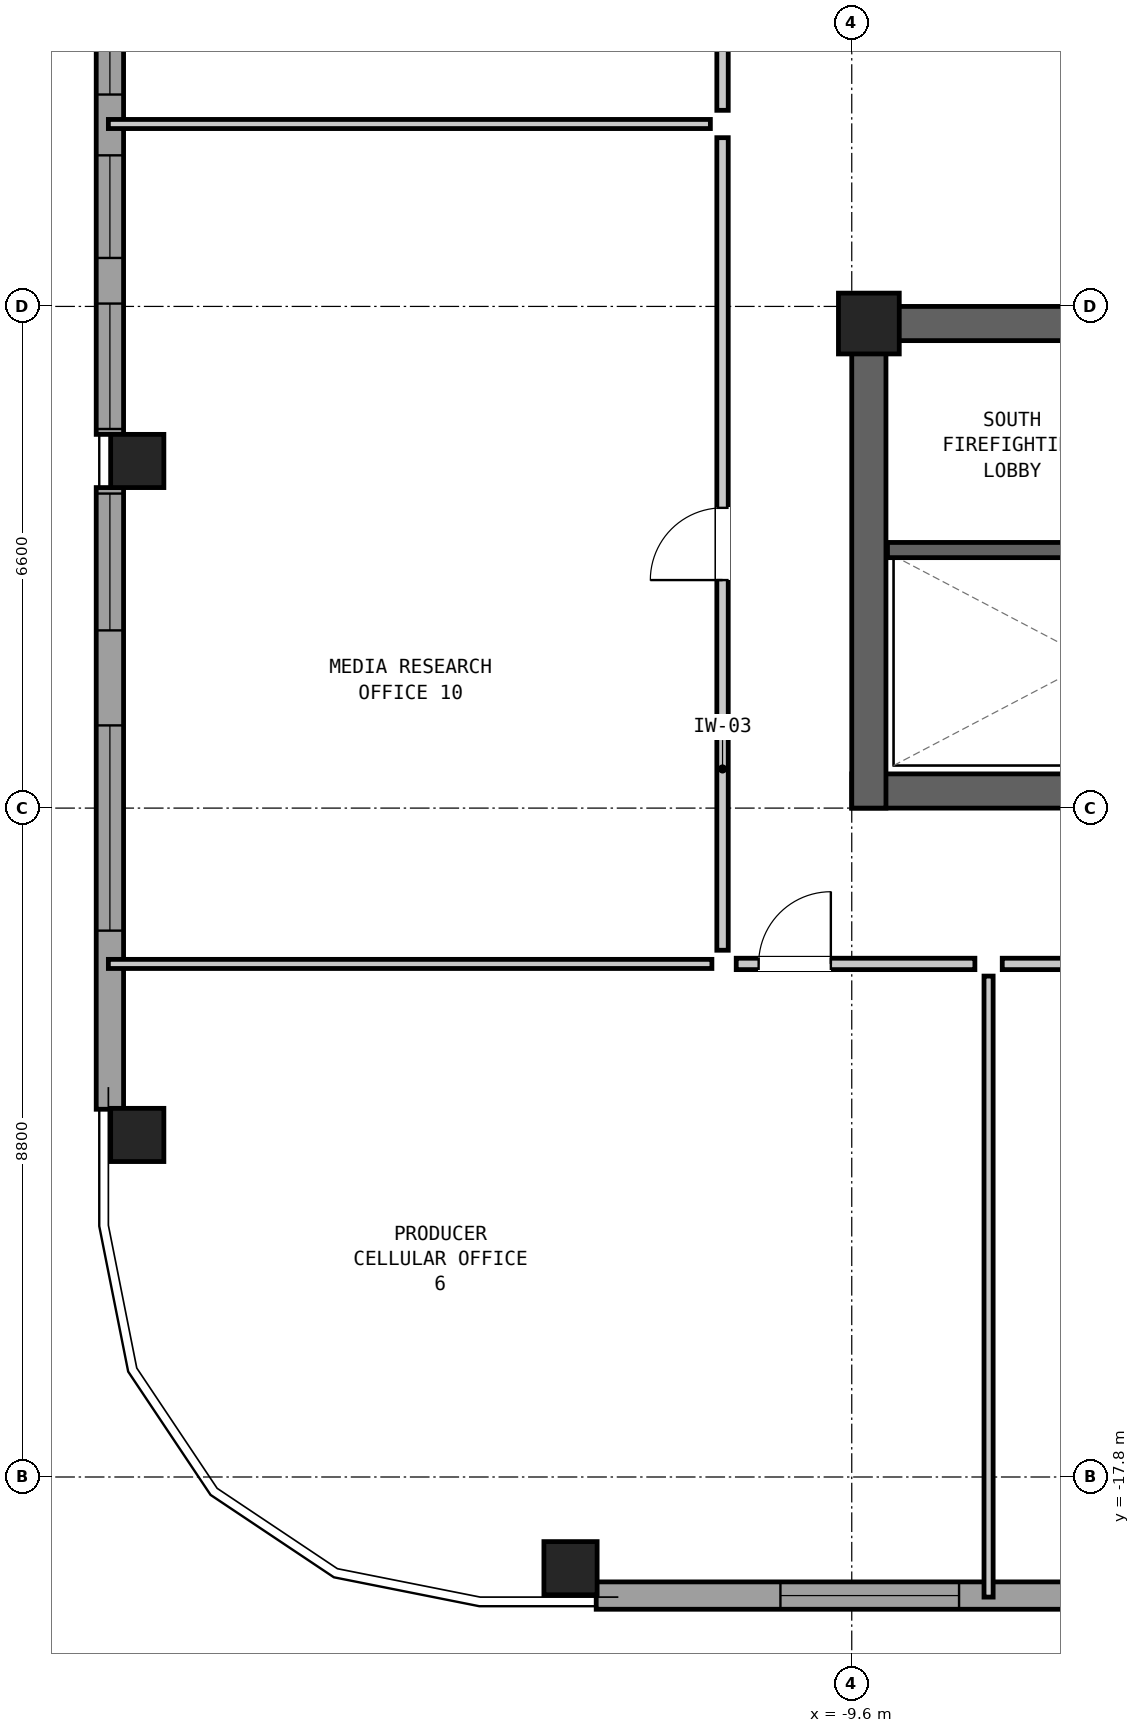
"""IFC4 building model, lengths in metres.
Left out: names, types, materials, properties, quantities, classifications, styles, units other than length and angle.
Written with IfcOpenShell. Run it as: python <this file> out.ifc"""

import sys

from ifc_helpers import new_model, si_unit, direction, frame, frame_2d, origin, origin_2d, place, context, subcontext, project, spatial, rectangle, hollow_rectangle, extrude, element, fill, save


model = new_model("IFC4")
c1 = context("Model", 3, precision=1e-05, world=origin(), true_north=direction((0.0, 1.0)))
c2 = subcontext(c1, "Body", "Model", "MODEL_VIEW")
j1 = project(units=[si_unit("LENGTHUNIT", "METRE"), si_unit("PLANEANGLEUNIT", "RADIAN")], contexts=[c1])
p1 = place(None, origin())
s1 = spatial("IfcSite", under=j1, at=p1, CompositionType="ELEMENT")
p2 = place(p1, origin())
s2 = spatial("IfcBuilding", under=s1, at=p2, CompositionType="ELEMENT")
p3 = place(p2, frame((0.0, 0.0, 208.65)))
s3 = spatial("IfcBuildingStorey", under=s2, at=p3, CompositionType="ELEMENT", Elevation=208.65)
p4 = place(p3, frame((-9.6, -8.775, 0.0), z_axis=(0.0, 0.0, 1.0), x_axis=(1.0, 0.0, 0.0)))
e1 = element("IfcWall", 1, at=p4, inside=s3, PredefinedType="SHEAR", context=c2, shape_type="SweptSolid", body=[
    extrude(rectangle(XDim=19.2, YDim=0.45, at=frame_2d((9.6, 0.0))), origin(), (0.0, 0.0, 1.0), 3.05),
])
p5 = place(p3, frame((-9.6, -2.625, 0.0), z_axis=(0.0, 0.0, 1.0), x_axis=(1.0, 0.0, 0.0)))
e2 = element("IfcWall", 2, at=p5, inside=s3, PredefinedType="SHEAR", context=c2, shape_type="SweptSolid", body=[
    extrude(rectangle(XDim=19.2, YDim=0.45, at=frame_2d((9.6, 0.0))), origin(), (0.0, 0.0, 1.0), 3.05),
])
p6 = place(p5, frame((3.8, 0.0, 0.0)))
e3 = element("IfcOpeningElement", 3, at=p6, cuts=e2, PredefinedType="OPENING", context=c2, shape_type="SweptSolid", body=[
    extrude(rectangle(XDim=1.1, YDim=2.08, at=frame_2d((0.55, 1.04))), frame((0.0, 0.237, 0.0), z_axis=(0.0, -1.0, 0.0), x_axis=(1.0, 0.0, 0.0)), (0.0, 0.0, 1.0), 0.474),
])
p7 = place(p5, frame((10.8, 0.0, 0.0)))
e4 = element("IfcOpeningElement", 4, at=p7, cuts=e2, PredefinedType="OPENING", context=c2, shape_type="SweptSolid", body=[
    extrude(rectangle(XDim=0.95, YDim=2.1, at=frame_2d((0.475, 1.05))), frame((0.0, 0.237, 0.0), z_axis=(0.0, -1.0, 0.0), x_axis=(1.0, 0.0, 0.0)), (0.0, 0.0, 1.0), 0.474),
])
p8 = place(p5, frame((14.8, 0.0, 0.0)))
e5 = element("IfcOpeningElement", 5, at=p8, cuts=e2, PredefinedType="OPENING", context=c2, shape_type="SweptSolid", body=[
    extrude(rectangle(XDim=1.6, YDim=2.12, at=frame_2d((0.8, 1.06))), frame((0.0, 0.237, 0.0), z_axis=(0.0, -1.0, 0.0), x_axis=(1.0, 0.0, 0.0)), (0.0, 0.0, 1.0), 0.474),
])
p9 = place(p3, frame((-9.375, -9.0, 0.0), z_axis=(0.0, 0.0, 1.0), x_axis=(0.0, 1.0, 0.0)))
e6 = element("IfcWall", 6, at=p9, inside=s3, PredefinedType="SHEAR", context=c2, shape_type="SweptSolid", body=[
    extrude(rectangle(XDim=6.6, YDim=0.45, at=frame_2d((3.3, 0.0))), origin(), (0.0, 0.0, 1.0), 3.05),
])
for number, where, z_axis, x_axis in (
    (7, (-13.3, -19.0, 0.0), (0.0, 0.0, 1.0), (1.0, 0.0, 0.0)),
    (8, (-19.0, -4.433, 0.0), (0.0, 0.0, 1.0), (0.0, 1.0, 0.0)),
    (9, (-19.0, -13.3, 0.0), (0.0, 0.0, 1.0), (0.0, 1.0, 0.0)),
):
    element("IfcColumn", number, at=place(p3, frame(where, z_axis=z_axis, x_axis=x_axis)), inside=s3, PredefinedType="COLUMN", context=c2, shape_type="SweptSolid", body=[
        extrude(hollow_rectangle(XDim=0.7, YDim=0.7, WallThickness=0.045, at=origin_2d()), origin(), (0.0, 0.0, 1.0), 3.05),
    ])
p10 = place(p3, frame((-9.375, -2.625, 0.0), z_axis=(0.0, 0.0, 1.0), x_axis=(1.0, 0.0, 0.0)))
e10 = element("IfcColumn", 10, at=p10, inside=s3, PredefinedType="COLUMN", context=c2, shape_type="SweptSolid", body=[
    extrude(rectangle(XDim=0.8, YDim=0.8, at=origin_2d()), origin(), (0.0, 0.0, 1.0), 3.05),
])
p11 = place(p3, frame((-4.783, -19.36, 0.0), z_axis=(0.0, 0.0, 1.0), x_axis=(-1.0, 0.0, 0.0)))
e11 = element("IfcWall", 11, at=p11, inside=s3, PredefinedType="SOLIDWALL", context=c2, shape_type="SweptSolid", body=[
    extrude(rectangle(XDim=8.179, YDim=0.36, at=frame_2d((4.089, 0.0))), origin(), (0.0, 0.0, 1.0), 2.374),
])
p12 = place(p11, frame((0.055, 0.0, 1.2)))
e12 = element("IfcOpeningElement", 12, at=p12, cuts=e11, PredefinedType="OPENING", context=c2, shape_type="SweptSolid", body=[
    extrude(rectangle(XDim=1.75, YDim=1.0, at=frame_2d((0.875, 0.5))), frame((0.0, 0.192, 0.0), z_axis=(0.0, -1.0, 0.0), x_axis=(1.0, 0.0, 0.0)), (0.0, 0.0, 1.0), 0.384),
])
p13 = place(p11, frame((3.405, 0.0, 0.2)))
e13 = element("IfcOpeningElement", 13, at=p13, cuts=e11, PredefinedType="OPENING", context=c2, shape_type="SweptSolid", body=[
    extrude(rectangle(XDim=2.35, YDim=1.15, at=frame_2d((1.175, 0.575))), frame((0.0, 0.192, 0.0), z_axis=(0.0, -1.0, 0.0), x_axis=(1.0, 0.0, 0.0)), (0.0, 0.0, 1.0), 0.384),
])
p14 = place(p3, frame((-19.36, -12.962, 0.0), z_axis=(0.0, 0.0, 1.0), x_axis=(0.0, 1.0, 0.0)))
e14 = element("IfcWall", 14, at=p14, inside=s3, PredefinedType="SOLIDWALL", context=c2, shape_type="SweptSolid", body=[
    extrude(rectangle(XDim=8.179, YDim=0.36, at=frame_2d((4.089, 0.0))), origin(), (0.0, 0.0, 1.0), 2.374),
])
p15 = place(p14, frame((2.35, 0.0, 0.2)))
e15 = element("IfcOpeningElement", 15, at=p15, cuts=e14, PredefinedType="OPENING", context=c2, shape_type="SweptSolid", body=[
    extrude(rectangle(XDim=2.7, YDim=1.2, at=frame_2d((1.35, 0.6))), frame((0.0, 0.192, 0.0), z_axis=(0.0, -1.0, 0.0), x_axis=(1.0, 0.0, 0.0)), (0.0, 0.0, 1.0), 0.384),
])
p16 = place(p14, frame((6.3, 0.0, 1.15)))
e16 = element("IfcOpeningElement", 16, at=p16, cuts=e14, PredefinedType="OPENING", context=c2, shape_type="SweptSolid", body=[
    extrude(rectangle(XDim=1.8, YDim=1.05, at=frame_2d((0.9, 0.525))), frame((0.0, 0.192, 0.0), z_axis=(0.0, -1.0, 0.0), x_axis=(1.0, 0.0, 0.0)), (0.0, 0.0, 1.0), 0.384),
])
p17 = place(p3, frame((-19.36, -4.083, 0.0), z_axis=(0.0, 0.0, 1.0), x_axis=(0.0, 1.0, 0.0)))
e17 = element("IfcWall", 17, at=p17, inside=s3, PredefinedType="SOLIDWALL", context=c2, shape_type="SweptSolid", body=[
    extrude(rectangle(XDim=8.167, YDim=0.36, at=frame_2d((4.083, 0.0))), origin(), (0.0, 0.0, 1.0), 2.374),
])
p18 = place(p17, frame((0.071, 0.0, 1.3)))
e18 = element("IfcOpeningElement", 18, at=p18, cuts=e17, PredefinedType="OPENING", context=c2, shape_type="SweptSolid", body=[
    extrude(rectangle(XDim=1.65, YDim=0.9, at=frame_2d((0.825, 0.45))), frame((0.0, 0.192, 0.0), z_axis=(0.0, -1.0, 0.0), x_axis=(1.0, 0.0, 0.0)), (0.0, 0.0, 1.0), 0.384),
])
p19 = place(p17, frame((2.321, 0.0, 0.2)))
e19 = element("IfcOpeningElement", 19, at=p19, cuts=e17, PredefinedType="OPENING", context=c2, shape_type="SweptSolid", body=[
    extrude(rectangle(XDim=1.35, YDim=0.95, at=frame_2d((0.675, 0.475))), frame((0.0, 0.192, 0.0), z_axis=(0.0, -1.0, 0.0), x_axis=(1.0, 0.0, 0.0)), (0.0, 0.0, 1.0), 0.384),
])
p20 = place(p17, frame((4.471, 0.0, 0.2)))
e20 = element("IfcOpeningElement", 20, at=p20, cuts=e17, PredefinedType="OPENING", context=c2, shape_type="SweptSolid", body=[
    extrude(rectangle(XDim=1.45, YDim=0.9, at=frame_2d((0.725, 0.45))), frame((0.0, 0.192, 0.0), z_axis=(0.0, -1.0, 0.0), x_axis=(1.0, 0.0, 0.0)), (0.0, 0.0, 1.0), 0.384),
])
p21 = place(p17, frame((6.521, 0.0, 1.25)))
e21 = element("IfcOpeningElement", 21, at=p21, cuts=e17, PredefinedType="OPENING", context=c2, shape_type="SweptSolid", body=[
    extrude(rectangle(XDim=1.6, YDim=0.95, at=frame_2d((0.8, 0.475))), frame((0.0, 0.192, 0.0), z_axis=(0.0, -1.0, 0.0), x_axis=(1.0, 0.0, 0.0)), (0.0, 0.0, 1.0), 0.384),
])
p22 = place(p3, frame((-9.13, -5.605, 0.0), z_axis=(0.0, 0.0, 1.0), x_axis=(1.0, 0.0, 0.0)))
e22 = element("IfcWall", 22, at=p22, inside=s3, PredefinedType="SHEAR", context=c2, shape_type="SweptSolid", body=[
    extrude(rectangle(XDim=6.77, YDim=0.2, at=frame_2d((3.385, 0.0))), origin(), (0.0, 0.0, 1.0), 2.86),
])
p23 = place(p22, frame((5.5, 0.0, 0.0)))
e23 = element("IfcOpeningElement", 23, at=p23, cuts=e22, PredefinedType="OPENING", context=c2, shape_type="SweptSolid", body=[
    extrude(rectangle(XDim=1.05, YDim=2.08, at=frame_2d((0.525, 1.04))), frame((0.0, 0.112, 0.0), z_axis=(0.0, -1.0, 0.0), x_axis=(1.0, 0.0, 0.0)), (0.0, 0.0, 1.0), 0.224),
])
p24 = place(p3, frame((-19.38, -11.05, 0.0), z_axis=(0.0, 0.0, 1.0), x_axis=(1.0, 0.0, 0.0)))
e24 = element("IfcWall", 24, at=p24, inside=s3, PredefinedType="PARTITIONING", context=c2, shape_type="SweptSolid", body=[
    extrude(rectangle(XDim=7.94, YDim=0.12, at=frame_2d((3.97, 0.0))), origin(), (0.0, 0.0, 1.0), 2.86),
])
p25 = place(p3, frame((-7.8, -19.38, 0.0), z_axis=(0.0, 0.0, 1.0), x_axis=(0.0, 1.0, 0.0)))
e25 = element("IfcWall", 25, at=p25, inside=s3, PredefinedType="PARTITIONING", context=c2, shape_type="SweptSolid", body=[
    extrude(rectangle(XDim=8.17, YDim=0.12, at=frame_2d((4.085, 0.0))), origin(), (0.0, 0.0, 1.0), 2.86),
])
p26 = place(p3, frame((-19.38, 0.0, 0.0), z_axis=(0.0, 0.0, 1.0), x_axis=(1.0, 0.0, 0.0)))
e26 = element("IfcWall", 26, at=p26, inside=s3, PredefinedType="PARTITIONING", context=c2, shape_type="SweptSolid", body=[
    extrude(rectangle(XDim=7.92, YDim=0.12, at=frame_2d((3.96, 0.0))), origin(), (0.0, 0.0, 1.0), 2.86),
])
p27 = place(p3, frame((-11.12, -11.05, 0.0), z_axis=(0.0, 0.0, 1.0), x_axis=(1.0, 0.0, 0.0)))
e27 = element("IfcWall", 27, at=p27, inside=s3, PredefinedType="PARTITIONING", context=c2, shape_type="SweptSolid", body=[
    extrude(rectangle(XDim=3.14, YDim=0.15, at=frame_2d((1.57, 0.0))), origin(), (0.0, 0.0, 1.0), 2.86),
])
p28 = place(p27, frame((0.295, 0.0, 0.0)))
e28 = element("IfcOpeningElement", 28, at=p28, cuts=e27, PredefinedType="OPENING", context=c2, shape_type="SweptSolid", body=[
    extrude(rectangle(XDim=0.95, YDim=2.1, at=frame_2d((0.475, 1.05))), frame((0.0, 0.087, 0.0), z_axis=(0.0, -1.0, 0.0), x_axis=(1.0, 0.0, 0.0)), (0.0, 0.0, 1.0), 0.174),
])
p29 = place(p3, frame((-7.62, -11.05, 0.0), z_axis=(0.0, 0.0, 1.0), x_axis=(1.0, 0.0, 0.0)))
e29 = element("IfcWall", 29, at=p29, inside=s3, PredefinedType="PARTITIONING", context=c2, shape_type="SweptSolid", body=[
    extrude(rectangle(XDim=5.24, YDim=0.15, at=frame_2d((2.62, 0.0))), origin(), (0.0, 0.0, 1.0), 2.86),
])
p30 = place(p29, frame((2.145, 0.0, 0.0)))
e30 = element("IfcOpeningElement", 30, at=p30, cuts=e29, PredefinedType="OPENING", context=c2, shape_type="SweptSolid", body=[
    extrude(rectangle(XDim=0.95, YDim=2.1, at=frame_2d((0.475, 1.05))), frame((0.0, 0.087, 0.0), z_axis=(0.0, -1.0, 0.0), x_axis=(1.0, 0.0, 0.0)), (0.0, 0.0, 1.0), 0.174),
])
p31 = place(p3, frame((-11.3, -10.87, 0.0), z_axis=(0.0, 0.0, 1.0), x_axis=(0.0, 1.0, 0.0)))
e31 = element("IfcWall", 31, at=p31, inside=s3, PredefinedType="PARTITIONING", context=c2, shape_type="SweptSolid", body=[
    extrude(rectangle(XDim=10.69, YDim=0.15, at=frame_2d((5.345, 0.0))), origin(), (0.0, 0.0, 1.0), 2.86),
])
p32 = place(p31, frame((4.87, 0.0, 0.0)))
e32 = element("IfcOpeningElement", 32, at=p32, cuts=e31, PredefinedType="OPENING", context=c2, shape_type="SweptSolid", body=[
    extrude(rectangle(XDim=0.95, YDim=2.1, at=frame_2d((0.475, 1.05))), frame((0.0, 0.087, 0.0), z_axis=(0.0, -1.0, 0.0), x_axis=(1.0, 0.0, 0.0)), (0.0, 0.0, 1.0), 0.174),
])
p33 = place(p3, frame((-11.3, 0.18, 0.0), z_axis=(0.0, 0.0, 1.0), x_axis=(0.0, 1.0, 0.0)))
e33 = element("IfcWall", 33, at=p33, inside=s3, PredefinedType="PARTITIONING", context=c2, shape_type="SweptSolid", body=[
    extrude(rectangle(XDim=11.89, YDim=0.15, at=frame_2d((5.945, 0.0))), origin(), (0.0, 0.0, 1.0), 2.86),
])
p34 = place(p33, frame((5.47, 0.0, 0.0)))
e34 = element("IfcOpeningElement", 34, at=p34, cuts=e33, PredefinedType="OPENING", context=c2, shape_type="SweptSolid", body=[
    extrude(rectangle(XDim=0.95, YDim=2.1, at=frame_2d((0.475, 1.05))), frame((0.0, 0.087, 0.0), z_axis=(0.0, -1.0, 0.0), x_axis=(1.0, 0.0, 0.0)), (0.0, 0.0, 1.0), 0.174),
])
p35 = place(p13, origin())
e35 = element("IfcWindow", 35, at=p35, inside=s3, PartitioningType="SINGLE_PANEL", PredefinedType="WINDOW", context=c2, shape_type="SweptSolid", body=[
    extrude(rectangle(XDim=2.35, YDim=1.15, at=frame_2d((1.175, 0.575))), frame((0.0, 0.03, 0.0), z_axis=(0.0, -1.0, 0.0), x_axis=(1.0, 0.0, 0.0)), (0.0, 0.0, 1.0), 0.06),
])
fill(e13, e35)
p36 = place(p15, origin())
e36 = element("IfcWindow", 36, at=p36, inside=s3, PartitioningType="SINGLE_PANEL", PredefinedType="WINDOW", context=c2, shape_type="SweptSolid", body=[
    extrude(rectangle(XDim=2.7, YDim=1.2, at=frame_2d((1.35, 0.6))), frame((0.0, 0.03, 0.0), z_axis=(0.0, -1.0, 0.0), x_axis=(1.0, 0.0, 0.0)), (0.0, 0.0, 1.0), 0.06),
])
fill(e15, e36)
p37 = place(p16, origin())
e37 = element("IfcWindow", 37, at=p37, inside=s3, PartitioningType="SINGLE_PANEL", PredefinedType="WINDOW", context=c2, shape_type="SweptSolid", body=[
    extrude(rectangle(XDim=1.8, YDim=1.05, at=frame_2d((0.9, 0.525))), frame((0.0, 0.03, 0.0), z_axis=(0.0, -1.0, 0.0), x_axis=(1.0, 0.0, 0.0)), (0.0, 0.0, 1.0), 0.06),
])
fill(e16, e37)
p38 = place(p18, origin())
e38 = element("IfcWindow", 38, at=p38, inside=s3, PartitioningType="SINGLE_PANEL", PredefinedType="WINDOW", context=c2, shape_type="SweptSolid", body=[
    extrude(rectangle(XDim=1.65, YDim=0.9, at=frame_2d((0.825, 0.45))), frame((0.0, 0.03, 0.0), z_axis=(0.0, -1.0, 0.0), x_axis=(1.0, 0.0, 0.0)), (0.0, 0.0, 1.0), 0.06),
])
fill(e18, e38)
p39 = place(p19, origin())
e39 = element("IfcWindow", 39, at=p39, inside=s3, PartitioningType="SINGLE_PANEL", PredefinedType="WINDOW", context=c2, shape_type="SweptSolid", body=[
    extrude(rectangle(XDim=1.35, YDim=0.95, at=frame_2d((0.675, 0.475))), frame((0.0, 0.03, 0.0), z_axis=(0.0, -1.0, 0.0), x_axis=(1.0, 0.0, 0.0)), (0.0, 0.0, 1.0), 0.06),
])
fill(e19, e39)
p40 = place(p20, origin())
e40 = element("IfcWindow", 40, at=p40, inside=s3, PartitioningType="SINGLE_PANEL", PredefinedType="WINDOW", context=c2, shape_type="SweptSolid", body=[
    extrude(rectangle(XDim=1.45, YDim=0.9, at=frame_2d((0.725, 0.45))), frame((0.0, 0.03, 0.0), z_axis=(0.0, -1.0, 0.0), x_axis=(1.0, 0.0, 0.0)), (0.0, 0.0, 1.0), 0.06),
])
fill(e20, e40)
p41 = place(p28, origin())
e41 = element("IfcDoor", 41, at=p41, inside=s3, OperationType="SINGLE_SWING_RIGHT", PredefinedType="DOOR", context=c2, shape_type="SweptSolid", body=[
    extrude(rectangle(XDim=0.95, YDim=2.1, at=frame_2d((0.475, 1.05))), frame((0.0, 0.025, 0.0), z_axis=(0.0, -1.0, 0.0), x_axis=(1.0, 0.0, 0.0)), (0.0, 0.0, 1.0), 0.05),
])
fill(e28, e41)
p42 = place(p32, origin())
e42 = element("IfcDoor", 42, at=p42, inside=s3, OperationType="SINGLE_SWING_LEFT", PredefinedType="DOOR", context=c2, shape_type="SweptSolid", body=[
    extrude(rectangle(XDim=0.95, YDim=2.1, at=frame_2d((0.475, 1.05))), frame((0.0, 0.025, 0.0), z_axis=(0.0, -1.0, 0.0), x_axis=(1.0, 0.0, 0.0)), (0.0, 0.0, 1.0), 0.05),
])
fill(e32, e42)
save(model, sys.argv[1])
